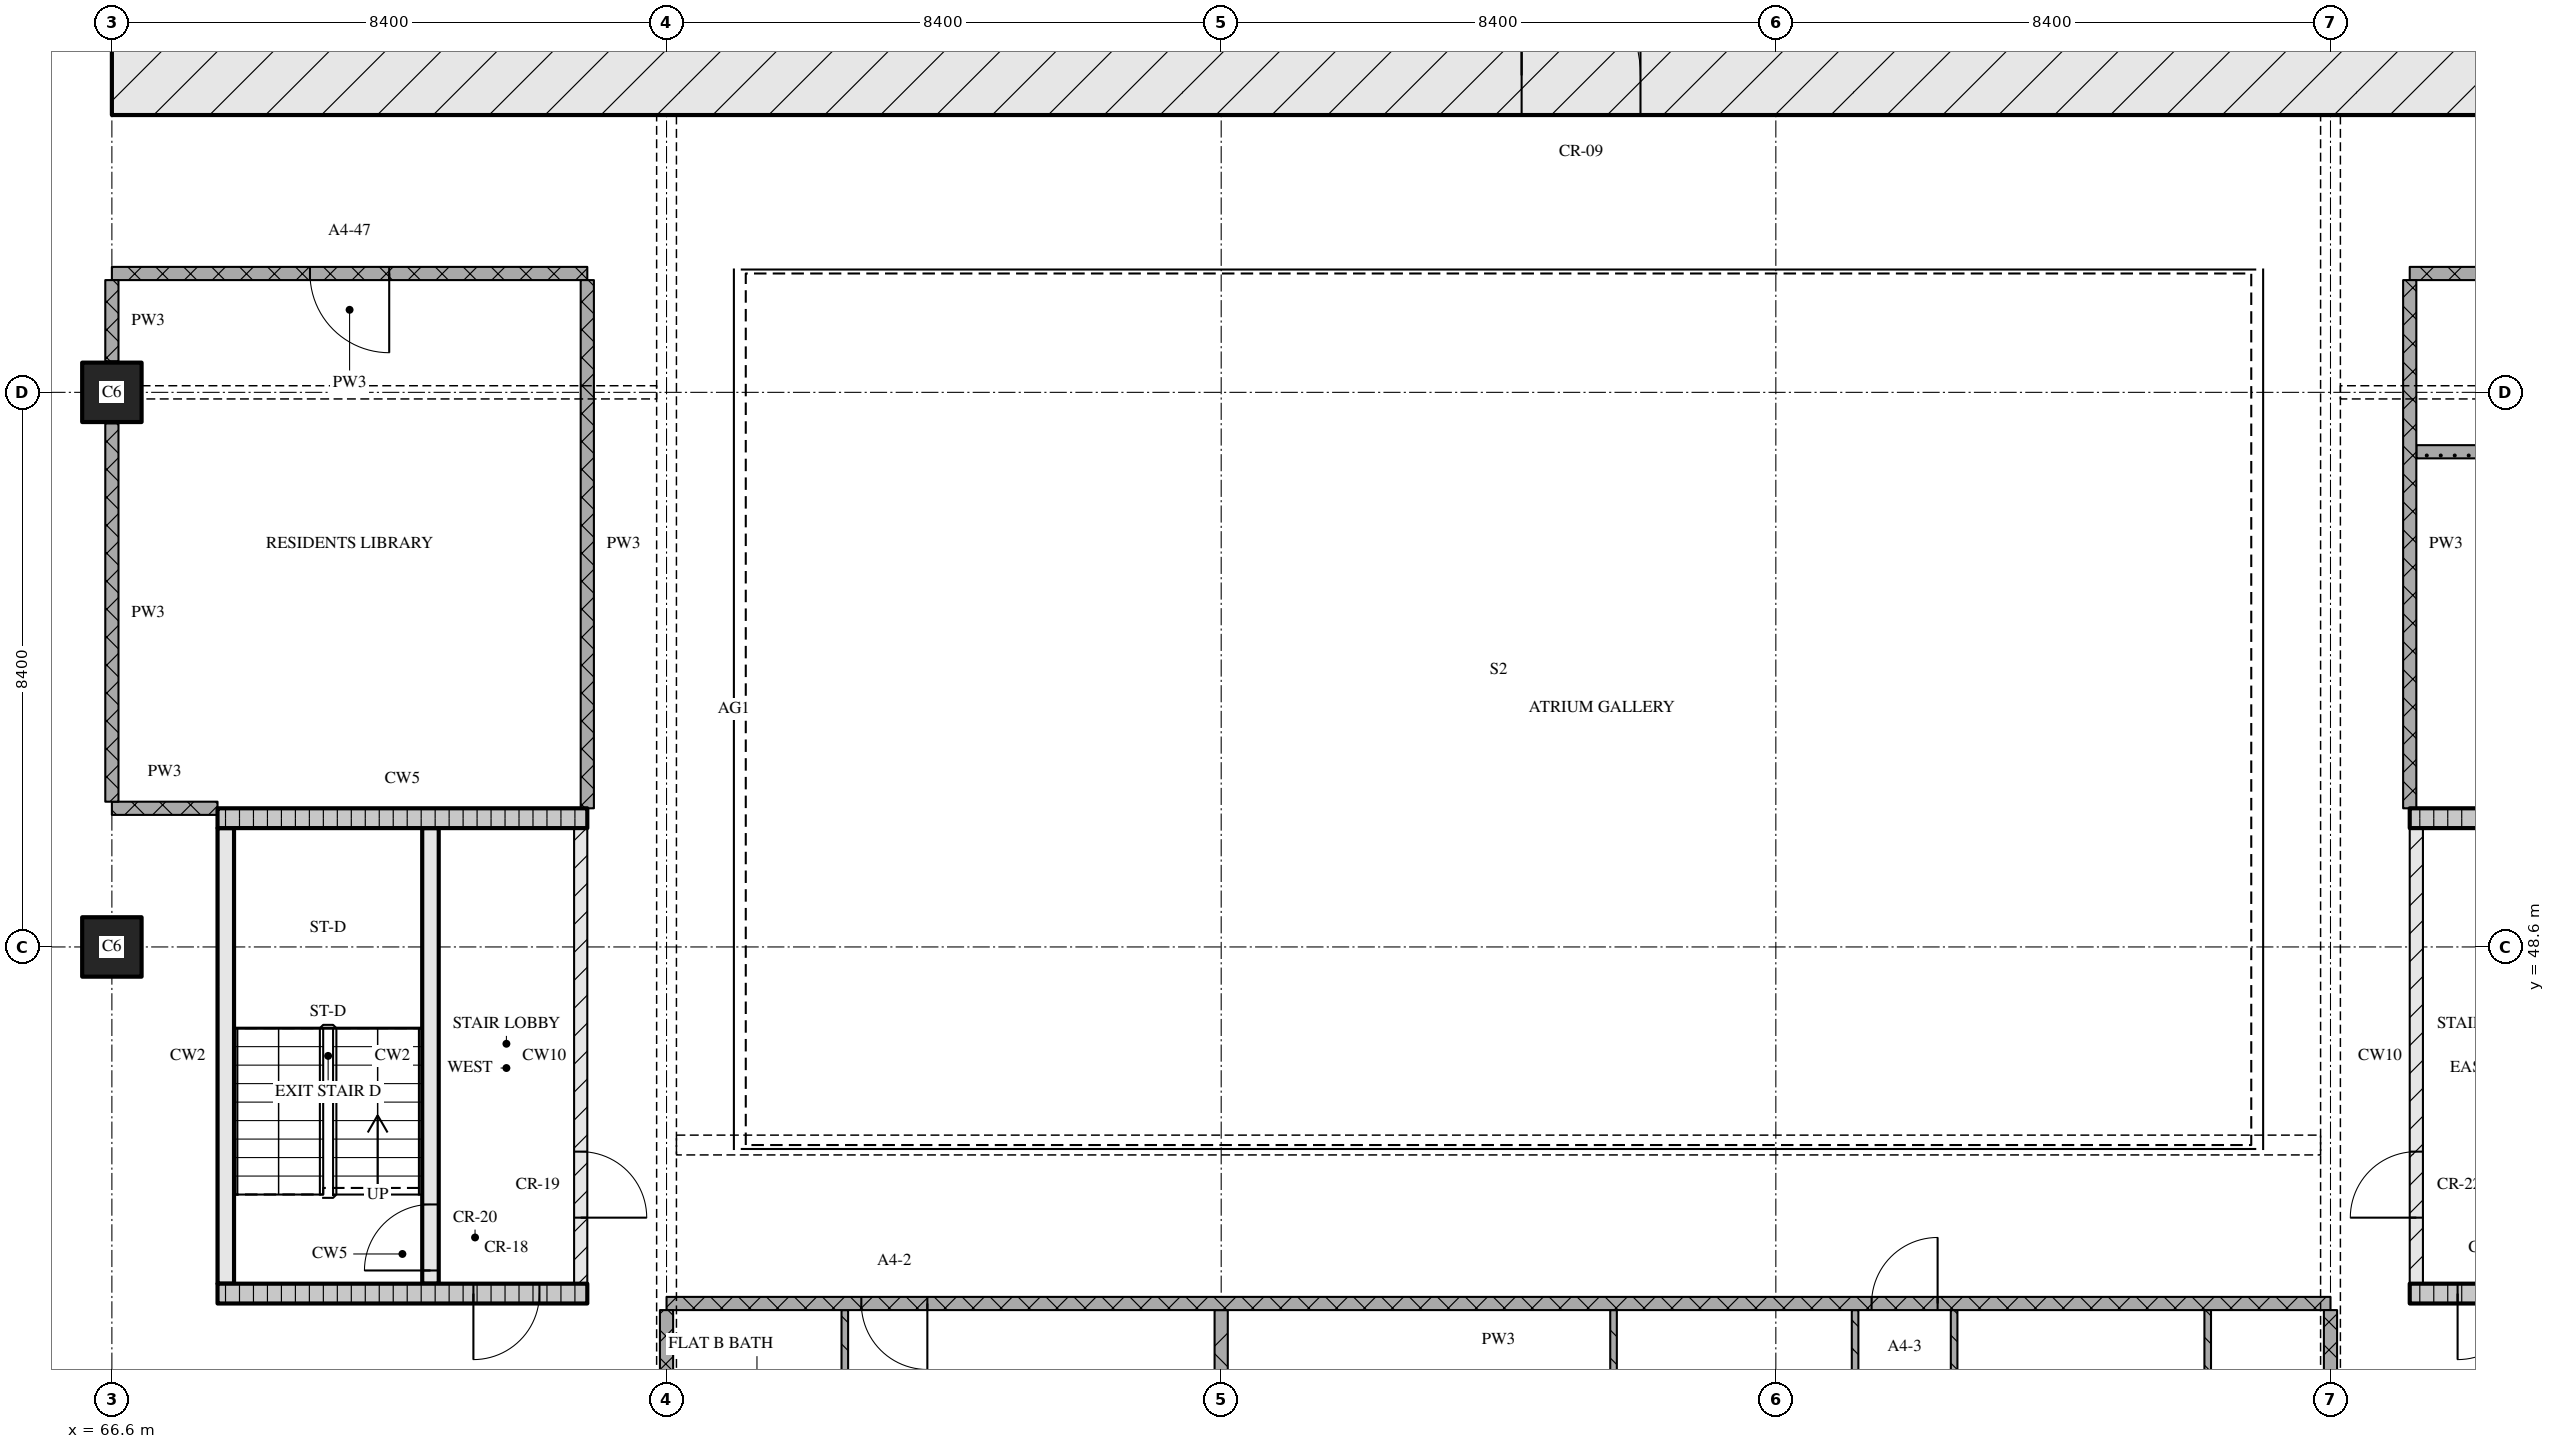
"""IFC4 building model, lengths in metres.
Left out: names, types, materials, properties, quantities, classifications, styles, units other than length and angle.
Written with IfcOpenShell. Run it as: python <this file> out.ifc"""

import sys

from ifc_helpers import new_model, si_unit, direction, frame, frame_2d, origin, origin_2d, place, context, subcontext, project, spatial, rectangle, extrude, element, fill, save


model = new_model("IFC4")
c1 = context("Model", 3, precision=1e-05, world=origin(), true_north=direction((0.0, 1.0)))
c2 = subcontext(c1, "Body", "Model", "MODEL_VIEW")
j1 = project(units=[si_unit("LENGTHUNIT", "METRE"), si_unit("PLANEANGLEUNIT", "RADIAN")], contexts=[c1])
p1 = place(None, origin())
s1 = spatial("IfcSite", under=j1, at=p1, CompositionType="ELEMENT")
p2 = place(p1, origin())
s2 = spatial("IfcBuilding", under=s1, at=p2, CompositionType="ELEMENT")
p3 = place(p2, frame((0.0, 0.0, 69.6)))
s3 = spatial("IfcBuildingStorey", under=s2, at=p3, CompositionType="ELEMENT", Elevation=69.6)
for number, where, z_axis, x_axis in (
    (1, (66.6, 48.6, 0.0), (0.0, 0.0, 1.0), (1.0, 0.0, 0.0)),
    (2, (66.6, 57.0, 0.0), (0.0, 0.0, 1.0), (1.0, 0.0, 0.0)),
):
    element("IfcColumn", number, at=place(p3, frame(where, z_axis=z_axis, x_axis=x_axis)), inside=s3, PredefinedType="COLUMN", context=c2, shape_type="SweptSolid", body=[
        extrude(rectangle(XDim=0.9, YDim=0.9, at=origin_2d()), origin(), (0.0, 0.0, 1.0), 3.6),
    ])
p4 = place(p3, frame((66.6, 61.8, 0.0), z_axis=(0.0, 0.0, 1.0), x_axis=(1.0, 0.0, 0.0)))
e3 = element("IfcWall", 3, at=p4, inside=s3, PredefinedType="SOLIDWALL", context=c2, shape_type="SweptSolid", body=[
    extrude(rectangle(XDim=42.0, YDim=1.2, at=frame_2d((21.0, 0.0))), origin(), (0.0, 0.0, 1.0), 3.32),
])
p5 = place(p4, frame((21.35, 0.0, 0.0)))
e4 = element("IfcOpeningElement", 4, at=p5, cuts=e3, PredefinedType="OPENING", context=c2, shape_type="SweptSolid", body=[
    extrude(rectangle(XDim=1.8, YDim=2.1, at=frame_2d((0.9, 1.05))), frame((0.0, 0.61, 0.0), z_axis=(0.0, -1.0, 0.0), x_axis=(1.0, 0.0, 0.0)), (0.0, 0.0, 1.0), 1.22),
])
p6 = place(p3, frame((68.2, 43.35, 0.0), z_axis=(0.0, 0.0, 1.0), x_axis=(1.0, 0.0, 0.0)))
e5 = element("IfcWall", 5, at=p6, inside=s3, PredefinedType="SOLIDWALL", context=c2, shape_type="SweptSolid", body=[
    extrude(rectangle(XDim=5.6, YDim=0.3, at=frame_2d((2.8, 0.0))), origin(), (0.0, 0.0, 1.0), 3.32),
])
p7 = place(p6, frame((3.875, 0.0, 0.0)))
e6 = element("IfcOpeningElement", 6, at=p7, cuts=e5, PredefinedType="OPENING", context=c2, shape_type="SweptSolid", body=[
    extrude(rectangle(XDim=1.0, YDim=2.1, at=frame_2d((0.5, 1.05))), frame((0.0, 0.16, 0.0), z_axis=(0.0, -1.0, 0.0), x_axis=(1.0, 0.0, 0.0)), (0.0, 0.0, 1.0), 0.32),
])
p8 = place(p3, frame((68.325, 43.5, 0.0), z_axis=(0.0, 0.0, 1.0), x_axis=(0.0, 1.0, 0.0)))
e7 = element("IfcWall", 7, at=p8, inside=s3, PredefinedType="SOLIDWALL", context=c2, shape_type="SweptSolid", body=[
    extrude(rectangle(XDim=6.9, YDim=0.25, at=frame_2d((3.45, 0.0))), origin(), (0.0, 0.0, 1.0), 3.32),
])
p9 = place(p3, frame((71.425, 43.5, 0.0), z_axis=(0.0, 0.0, 1.0), x_axis=(0.0, 1.0, 0.0)))
e8 = element("IfcWall", 8, at=p9, inside=s3, PredefinedType="SOLIDWALL", context=c2, shape_type="SweptSolid", body=[
    extrude(rectangle(XDim=6.9, YDim=0.25, at=frame_2d((3.45, 0.0))), origin(), (0.0, 0.0, 1.0), 3.32),
])
p10 = place(p9, frame((0.2, 0.0, 0.0)))
e9 = element("IfcOpeningElement", 9, at=p10, cuts=e8, PredefinedType="OPENING", context=c2, shape_type="SweptSolid", body=[
    extrude(rectangle(XDim=1.0, YDim=2.1, at=frame_2d((0.5, 1.05))), frame((0.0, 0.135, 0.0), z_axis=(0.0, -1.0, 0.0), x_axis=(1.0, 0.0, 0.0)), (0.0, 0.0, 1.0), 0.27),
])
p11 = place(p3, frame((73.7, 43.5, 0.0), z_axis=(0.0, 0.0, 1.0), x_axis=(0.0, 1.0, 0.0)))
e10 = element("IfcWall", 10, at=p11, inside=s3, PredefinedType="PARTITIONING", context=c2, shape_type="SweptSolid", body=[
    extrude(rectangle(XDim=6.9, YDim=0.2, at=frame_2d((3.45, 0.0))), origin(), (0.0, 0.0, 1.0), 3.32),
])
p12 = place(p11, frame((1.0, 0.0, 0.0)))
e11 = element("IfcOpeningElement", 11, at=p12, cuts=e10, PredefinedType="OPENING", context=c2, shape_type="SweptSolid", body=[
    extrude(rectangle(XDim=1.0, YDim=2.1, at=frame_2d((0.5, 1.05))), frame((0.0, 0.11, 0.0), z_axis=(0.0, -1.0, 0.0), x_axis=(1.0, 0.0, 0.0)), (0.0, 0.0, 1.0), 0.22),
])
p13 = place(p3, frame((68.2, 50.55, 0.0), z_axis=(0.0, 0.0, 1.0), x_axis=(1.0, 0.0, 0.0)))
e12 = element("IfcWall", 12, at=p13, inside=s3, PredefinedType="SOLIDWALL", context=c2, shape_type="SweptSolid", body=[
    extrude(rectangle(XDim=5.6, YDim=0.3, at=frame_2d((2.8, 0.0))), origin(), (0.0, 0.0, 1.0), 3.32),
])
p14 = place(p3, frame((101.4, 43.35, 0.0), z_axis=(0.0, 0.0, 1.0), x_axis=(1.0, 0.0, 0.0)))
e13 = element("IfcWall", 13, at=p14, inside=s3, PredefinedType="SOLIDWALL", context=c2, shape_type="SweptSolid", body=[
    extrude(rectangle(XDim=5.6, YDim=0.3, at=frame_2d((2.8, 0.0))), origin(), (0.0, 0.0, 1.0), 3.32),
])
p15 = place(p14, frame((0.725, 0.0, 0.0)))
e14 = element("IfcOpeningElement", 14, at=p15, cuts=e13, PredefinedType="OPENING", context=c2, shape_type="SweptSolid", body=[
    extrude(rectangle(XDim=1.0, YDim=2.1, at=frame_2d((0.5, 1.05))), frame((0.0, 0.16, 0.0), z_axis=(0.0, -1.0, 0.0), x_axis=(1.0, 0.0, 0.0)), (0.0, 0.0, 1.0), 0.32),
])
p16 = place(p3, frame((101.5, 43.5, 0.0), z_axis=(0.0, 0.0, 1.0), x_axis=(0.0, 1.0, 0.0)))
e15 = element("IfcWall", 15, at=p16, inside=s3, PredefinedType="PARTITIONING", context=c2, shape_type="SweptSolid", body=[
    extrude(rectangle(XDim=6.9, YDim=0.2, at=frame_2d((3.45, 0.0))), origin(), (0.0, 0.0, 1.0), 3.32),
])
p17 = place(p16, frame((1.0, 0.0, 0.0)))
e16 = element("IfcOpeningElement", 16, at=p17, cuts=e15, PredefinedType="OPENING", context=c2, shape_type="SweptSolid", body=[
    extrude(rectangle(XDim=1.0, YDim=2.1, at=frame_2d((0.5, 1.05))), frame((0.0, 0.11, 0.0), z_axis=(0.0, -1.0, 0.0), x_axis=(1.0, 0.0, 0.0)), (0.0, 0.0, 1.0), 0.22),
])
p18 = place(p3, frame((101.4, 50.55, 0.0), z_axis=(0.0, 0.0, 1.0), x_axis=(1.0, 0.0, 0.0)))
e17 = element("IfcWall", 17, at=p18, inside=s3, PredefinedType="SOLIDWALL", context=c2, shape_type="SweptSolid", body=[
    extrude(rectangle(XDim=5.6, YDim=0.3, at=frame_2d((2.8, 0.0))), origin(), (0.0, 0.0, 1.0), 3.32),
])
p19 = place(p3, frame((100.2, 43.2, 0.0), z_axis=(0.0, 0.0, 1.0), x_axis=(-1.0, 0.0, 0.0)))
e18 = element("IfcWall", 18, at=p19, inside=s3, PredefinedType="PARTITIONING", context=c2, shape_type="SweptSolid", body=[
    extrude(rectangle(XDim=25.2, YDim=0.2, at=frame_2d((12.6, 0.0))), origin(), (0.0, 0.0, 1.0), 3.32),
])
p20 = place(p19, frame((5.95, 0.0, 0.0)))
e19 = element("IfcOpeningElement", 19, at=p20, cuts=e18, PredefinedType="OPENING", context=c2, shape_type="SweptSolid", body=[
    extrude(rectangle(XDim=1.0, YDim=2.1, at=frame_2d((0.5, 1.05))), frame((0.0, 0.11, 0.0), z_axis=(0.0, -1.0, 0.0), x_axis=(1.0, 0.0, 0.0)), (0.0, 0.0, 1.0), 0.22),
])
p21 = place(p19, frame((21.25, 0.0, 0.0)))
e20 = element("IfcOpeningElement", 20, at=p21, cuts=e18, PredefinedType="OPENING", context=c2, shape_type="SweptSolid", body=[
    extrude(rectangle(XDim=1.0, YDim=2.1, at=frame_2d((0.5, 1.05))), frame((0.0, 0.11, 0.0), z_axis=(0.0, -1.0, 0.0), x_axis=(1.0, 0.0, 0.0)), (0.0, 0.0, 1.0), 0.22),
])
p22 = place(p3, frame((66.6, 50.7, 0.0), z_axis=(0.0, 0.0, 1.0), x_axis=(1.0, 0.0, 0.0)))
e21 = element("IfcWall", 21, at=p22, inside=s3, PredefinedType="PARTITIONING", context=c2, shape_type="SweptSolid", body=[
    extrude(rectangle(XDim=1.6, YDim=0.2, at=frame_2d((0.8, 0.0))), origin(), (0.0, 0.0, 1.0), 3.32),
])
p23 = place(p3, frame((101.5, 56.1, 0.0), z_axis=(0.0, 0.0, 1.0), x_axis=(1.0, 0.0, 0.0)))
e22 = element("IfcWall", 22, at=p23, inside=s3, PredefinedType="PARTITIONING", context=c2, shape_type="SweptSolid", body=[
    extrude(rectangle(XDim=7.0, YDim=0.2, at=frame_2d((3.5, 0.0))), origin(), (0.0, 0.0, 1.0), 3.32),
])
p24 = place(p3, frame((73.8, 58.8, 0.0), z_axis=(0.0, 0.0, 1.0), x_axis=(-1.0, 0.0, 0.0)))
e23 = element("IfcWall", 23, at=p24, inside=s3, PredefinedType="PARTITIONING", context=c2, shape_type="SweptSolid", body=[
    extrude(rectangle(XDim=7.2, YDim=0.2, at=frame_2d((3.6, 0.0))), origin(), (0.0, 0.0, 1.0), 3.32),
])
p25 = place(p24, frame((3.0, 0.0, 0.0)))
e24 = element("IfcOpeningElement", 24, at=p25, cuts=e23, PredefinedType="OPENING", context=c2, shape_type="SweptSolid", body=[
    extrude(rectangle(XDim=1.2, YDim=2.1, at=frame_2d((0.6, 1.05))), frame((0.0, 0.11, 0.0), z_axis=(0.0, -1.0, 0.0), x_axis=(1.0, 0.0, 0.0)), (0.0, 0.0, 1.0), 0.22),
])
p26 = place(p3, frame((101.4, 58.8, 0.0), z_axis=(0.0, 0.0, 1.0), x_axis=(1.0, 0.0, 0.0)))
e25 = element("IfcWall", 25, at=p26, inside=s3, PredefinedType="PARTITIONING", context=c2, shape_type="SweptSolid", body=[
    extrude(rectangle(XDim=7.2, YDim=0.2, at=frame_2d((3.6, 0.0))), origin(), (0.0, 0.0, 1.0), 3.32),
])
p27 = place(p3, frame((66.6, 56.53, 0.0), z_axis=(0.0, 0.0, 1.0), x_axis=(0.0, -1.0, 0.0)))
e26 = element("IfcWall", 26, at=p27, inside=s3, PredefinedType="PARTITIONING", context=c2, shape_type="SweptSolid", body=[
    extrude(rectangle(XDim=5.73, YDim=0.2, at=frame_2d((2.865, 0.0))), origin(), (0.0, 0.0, 1.0), 3.32),
])
p28 = place(p3, frame((66.6, 58.7, 0.0), z_axis=(0.0, 0.0, 1.0), x_axis=(0.0, -1.0, 0.0)))
e27 = element("IfcWall", 27, at=p28, inside=s3, PredefinedType="PARTITIONING", context=c2, shape_type="SweptSolid", body=[
    extrude(rectangle(XDim=1.23, YDim=0.2, at=frame_2d((0.615, 0.0))), origin(), (0.0, 0.0, 1.0), 3.32),
])
p29 = place(p3, frame((73.8, 58.7, 0.0), z_axis=(0.0, 0.0, 1.0), x_axis=(0.0, -1.0, 0.0)))
e28 = element("IfcWall", 28, at=p29, inside=s3, PredefinedType="PARTITIONING", context=c2, shape_type="SweptSolid", body=[
    extrude(rectangle(XDim=8.0, YDim=0.2, at=frame_2d((4.0, 0.0))), origin(), (0.0, 0.0, 1.0), 3.32),
])
p30 = place(p3, frame((75.0, 43.1, 0.0), z_axis=(0.0, 0.0, 1.0), x_axis=(0.0, -1.0, 0.0)))
e29 = element("IfcWall", 29, at=p30, inside=s3, PredefinedType="PARTITIONING", context=c2, shape_type="SweptSolid", body=[
    extrude(rectangle(XDim=2.2, YDim=0.2, at=frame_2d((1.1, 0.0))), origin(), (0.0, 0.0, 1.0), 2.43),
])
p31 = place(p3, frame((77.7, 43.1, 0.0), z_axis=(0.0, 0.0, 1.0), x_axis=(0.0, -1.0, 0.0)))
e30 = element("IfcWall", 30, at=p31, inside=s3, PredefinedType="PARTITIONING", context=c2, shape_type="SweptSolid", body=[
    extrude(rectangle(XDim=2.85, YDim=0.1, at=frame_2d((1.425, 0.0))), origin(), (0.0, 0.0, 1.0), 3.32),
])
p32 = place(p3, frame((83.4, 43.1, 0.0), z_axis=(0.0, 0.0, 1.0), x_axis=(0.0, -1.0, 0.0)))
e31 = element("IfcWall", 31, at=p32, inside=s3, PredefinedType="PARTITIONING", context=c2, shape_type="SweptSolid", body=[
    extrude(rectangle(XDim=2.43, YDim=0.2, at=frame_2d((1.215, 0.0))), origin(), (0.0, 0.0, 1.0), 3.32),
])
for number, where, z_axis, x_axis in (
    (32, (89.342, 43.1, 0.0), (0.0, 0.0, 1.0), (0.0, -1.0, 0.0)),
    (33, (93.0, 43.1, 0.0), (0.0, 0.0, 1.0), (0.0, -1.0, 0.0)),
):
    element("IfcWall", number, at=place(p3, frame(where, z_axis=z_axis, x_axis=x_axis)), inside=s3, PredefinedType="PARTITIONING", context=c2, shape_type="SweptSolid", body=[
        extrude(rectangle(XDim=6.75, YDim=0.1, at=frame_2d((3.375, 0.0))), origin(), (0.0, 0.0, 1.0), 3.32),
    ])
p33 = place(p3, frame((94.5, 43.1, 0.0), z_axis=(0.0, 0.0, 1.0), x_axis=(0.0, -1.0, 0.0)))
e34 = element("IfcWall", 34, at=p33, inside=s3, PredefinedType="PARTITIONING", context=c2, shape_type="SweptSolid", body=[
    extrude(rectangle(XDim=6.75, YDim=0.1, at=frame_2d((3.375, 0.0))), origin(), (0.0, 0.0, 1.0), 3.32),
])
p34 = place(p33, frame((2.95, 0.0, 0.0)))
e35 = element("IfcOpeningElement", 35, at=p34, cuts=e34, PredefinedType="OPENING", context=c2, shape_type="SweptSolid", body=[
    extrude(rectangle(XDim=0.8, YDim=2.1, at=frame_2d((0.4, 1.05))), frame((0.0, 0.06, 0.0), z_axis=(0.0, -1.0, 0.0), x_axis=(1.0, 0.0, 0.0)), (0.0, 0.0, 1.0), 0.12),
])
p35 = place(p3, frame((98.341, 43.1, 0.0), z_axis=(0.0, 0.0, 1.0), x_axis=(0.0, -1.0, 0.0)))
e36 = element("IfcWall", 36, at=p35, inside=s3, PredefinedType="PARTITIONING", context=c2, shape_type="SweptSolid", body=[
    extrude(rectangle(XDim=6.75, YDim=0.1, at=frame_2d((3.375, 0.0))), origin(), (0.0, 0.0, 1.0), 3.32),
])
p36 = place(p3, frame((100.2, 43.1, 0.0), z_axis=(0.0, 0.0, 1.0), x_axis=(0.0, -1.0, 0.0)))
e37 = element("IfcWall", 37, at=p36, inside=s3, PredefinedType="PARTITIONING", context=c2, shape_type="SweptSolid", body=[
    extrude(rectangle(XDim=2.2, YDim=0.2, at=frame_2d((1.1, 0.0))), origin(), (0.0, 0.0, 1.0), 2.43),
])
p37 = place(p3, frame((101.4, 58.7, 0.0), z_axis=(0.0, 0.0, 1.0), x_axis=(0.0, -1.0, 0.0)))
e38 = element("IfcWall", 38, at=p37, inside=s3, PredefinedType="PARTITIONING", context=c2, shape_type="SweptSolid", body=[
    extrude(rectangle(XDim=8.0, YDim=0.2, at=frame_2d((4.0, 0.0))), origin(), (0.0, 0.0, 1.0), 3.32),
])
p38 = place(p5, origin())
e39 = element("IfcDoor", 39, at=p38, inside=s3, OperationType="DOUBLE_DOOR_SINGLE_SWING", PredefinedType="DOOR", context=c2, shape_type="SweptSolid", body=[
    extrude(rectangle(XDim=1.8, YDim=2.1, at=frame_2d((0.9, 1.05))), frame((0.0, 0.025, 0.0), z_axis=(0.0, -1.0, 0.0), x_axis=(1.0, 0.0, 0.0)), (0.0, 0.0, 1.0), 0.05),
])
fill(e4, e39)
p39 = place(p7, origin())
e40 = element("IfcDoor", 40, at=p39, inside=s3, OperationType="SINGLE_SWING_RIGHT", PredefinedType="DOOR", context=c2, shape_type="SweptSolid", body=[
    extrude(rectangle(XDim=1.0, YDim=2.1, at=frame_2d((0.5, 1.05))), frame((0.0, 0.025, 0.0), z_axis=(0.0, -1.0, 0.0), x_axis=(1.0, 0.0, 0.0)), (0.0, 0.0, 1.0), 0.05),
])
fill(e6, e40)
p40 = place(p10, origin())
e41 = element("IfcDoor", 41, at=p40, inside=s3, OperationType="SINGLE_SWING_LEFT", PredefinedType="DOOR", context=c2, shape_type="SweptSolid", body=[
    extrude(rectangle(XDim=1.0, YDim=2.1, at=frame_2d((0.5, 1.05))), frame((0.0, 0.025, 0.0), z_axis=(0.0, -1.0, 0.0), x_axis=(1.0, 0.0, 0.0)), (0.0, 0.0, 1.0), 0.05),
])
fill(e9, e41)
p41 = place(p12, origin())
e42 = element("IfcDoor", 42, at=p41, inside=s3, OperationType="SINGLE_SWING_RIGHT", PredefinedType="DOOR", context=c2, shape_type="SweptSolid", body=[
    extrude(rectangle(XDim=1.0, YDim=2.1, at=frame_2d((0.5, 1.05))), frame((0.0, 0.025, 0.0), z_axis=(0.0, -1.0, 0.0), x_axis=(1.0, 0.0, 0.0)), (0.0, 0.0, 1.0), 0.05),
])
fill(e11, e42)
p42 = place(p15, origin())
e43 = element("IfcDoor", 43, at=p42, inside=s3, OperationType="SINGLE_SWING_RIGHT", PredefinedType="DOOR", context=c2, shape_type="SweptSolid", body=[
    extrude(rectangle(XDim=1.0, YDim=2.1, at=frame_2d((0.5, 1.05))), frame((0.0, 0.025, 0.0), z_axis=(0.0, -1.0, 0.0), x_axis=(1.0, 0.0, 0.0)), (0.0, 0.0, 1.0), 0.05),
])
fill(e14, e43)
p43 = place(p17, origin())
e44 = element("IfcDoor", 44, at=p43, inside=s3, OperationType="SINGLE_SWING_LEFT", PredefinedType="DOOR", context=c2, shape_type="SweptSolid", body=[
    extrude(rectangle(XDim=1.0, YDim=2.1, at=frame_2d((0.5, 1.05))), frame((0.0, 0.025, 0.0), z_axis=(0.0, -1.0, 0.0), x_axis=(1.0, 0.0, 0.0)), (0.0, 0.0, 1.0), 0.05),
])
fill(e16, e44)
p44 = place(p20, origin())
e45 = element("IfcDoor", 45, at=p44, inside=s3, OperationType="SINGLE_SWING_RIGHT", PredefinedType="DOOR", context=c2, shape_type="SweptSolid", body=[
    extrude(rectangle(XDim=1.0, YDim=2.1, at=frame_2d((0.5, 1.05))), frame((0.0, 0.025, 0.0), z_axis=(0.0, -1.0, 0.0), x_axis=(1.0, 0.0, 0.0)), (0.0, 0.0, 1.0), 0.05),
])
fill(e19, e45)
p45 = place(p21, origin())
e46 = element("IfcDoor", 46, at=p45, inside=s3, OperationType="SINGLE_SWING_LEFT", PredefinedType="DOOR", context=c2, shape_type="SweptSolid", body=[
    extrude(rectangle(XDim=1.0, YDim=2.1, at=frame_2d((0.5, 1.05))), frame((0.0, 0.025, 0.0), z_axis=(0.0, -1.0, 0.0), x_axis=(1.0, 0.0, 0.0)), (0.0, 0.0, 1.0), 0.05),
])
fill(e20, e46)
p46 = place(p25, origin())
e47 = element("IfcDoor", 47, at=p46, inside=s3, OperationType="SINGLE_SWING_LEFT", PredefinedType="DOOR", context=c2, shape_type="SweptSolid", body=[
    extrude(rectangle(XDim=1.2, YDim=2.1, at=frame_2d((0.6, 1.05))), frame((0.0, 0.025, 0.0), z_axis=(0.0, -1.0, 0.0), x_axis=(1.0, 0.0, 0.0)), (0.0, 0.0, 1.0), 0.05),
])
fill(e24, e47)
save(model, sys.argv[1])
